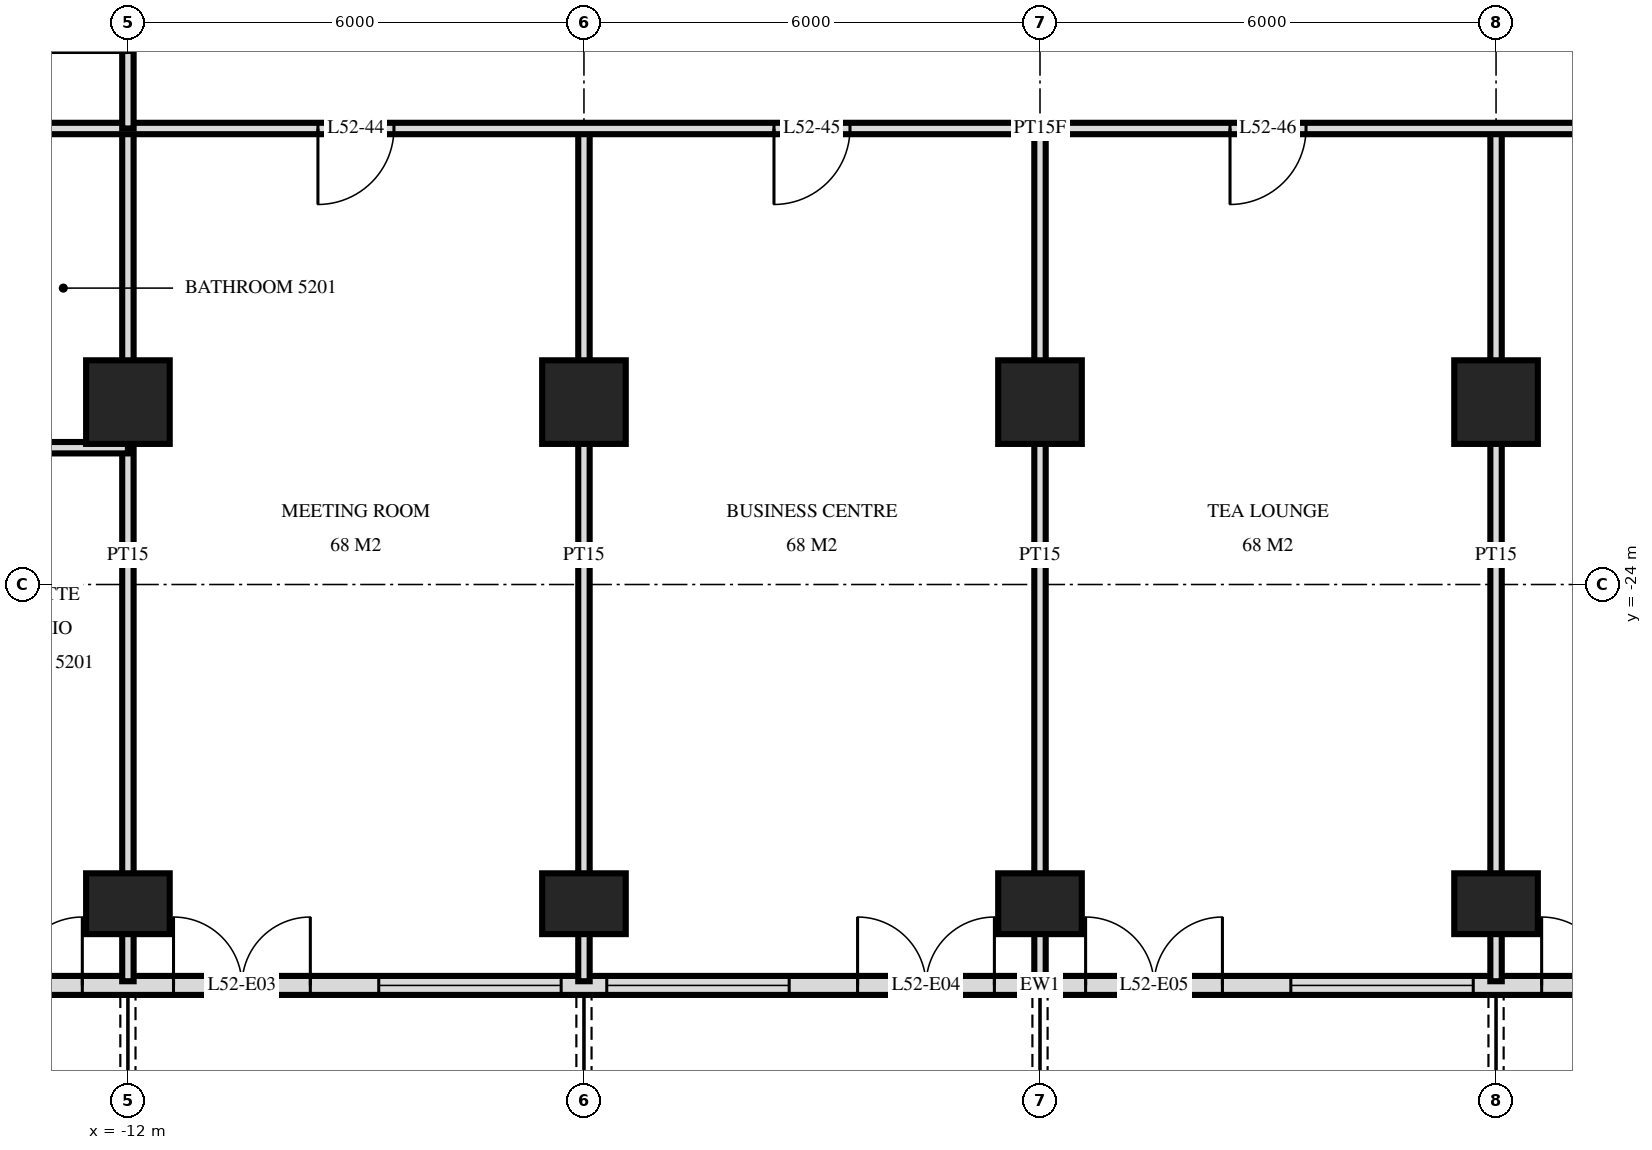
"""IFC4 building model, lengths in metres.
Left out: names, types, materials, properties, quantities, classifications, styles, units other than length and angle.
Written with IfcOpenShell. Run it as: python <this file> out.ifc"""

import sys

from ifc_helpers import new_model, si_unit, direction, frame, frame_2d, origin, origin_2d, place, context, subcontext, project, spatial, rectangle, extrude, element, fill, save


model = new_model("IFC4")
c1 = context("Model", 3, precision=1e-05, world=origin(), true_north=direction((0.0, 1.0)))
c2 = subcontext(c1, "Body", "Model", "MODEL_VIEW")
j1 = project(units=[si_unit("LENGTHUNIT", "METRE"), si_unit("PLANEANGLEUNIT", "RADIAN")], contexts=[c1])
p1 = place(None, origin())
s1 = spatial("IfcSite", under=j1, at=p1, CompositionType="ELEMENT")
p2 = place(p1, origin())
s2 = spatial("IfcBuilding", under=s1, at=p2, CompositionType="ELEMENT")
p3 = place(p2, frame((0.0, 0.0, 201.1)))
s3 = spatial("IfcBuildingStorey", under=s2, at=p3, CompositionType="ELEMENT", Elevation=201.1)
p4 = place(p3, frame((-12.0, -28.2, 0.0), z_axis=(0.0, 0.0, 1.0), x_axis=(1.0, 0.0, 0.0)))
e1 = element("IfcColumn", 1, at=p4, inside=s3, PredefinedType="COLUMN", context=c2, shape_type="SweptSolid", body=[
    extrude(rectangle(XDim=1.1, YDim=0.8, at=origin_2d()), origin(), (0.0, 0.0, 1.0), 3.5),
])
p5 = place(p3, frame((-12.0, -21.6, 0.0), z_axis=(0.0, 0.0, 1.0), x_axis=(1.0, 0.0, 0.0)))
e2 = element("IfcColumn", 2, at=p5, inside=s3, PredefinedType="COLUMN", context=c2, shape_type="SweptSolid", body=[
    extrude(rectangle(XDim=1.1, YDim=1.1, at=origin_2d()), origin(), (0.0, 0.0, 1.0), 3.5),
])
p6 = place(p3, frame((-6.0, -28.2, 0.0), z_axis=(0.0, 0.0, 1.0), x_axis=(1.0, 0.0, 0.0)))
e3 = element("IfcColumn", 3, at=p6, inside=s3, PredefinedType="COLUMN", context=c2, shape_type="SweptSolid", body=[
    extrude(rectangle(XDim=1.1, YDim=0.8, at=origin_2d()), origin(), (0.0, 0.0, 1.0), 3.5),
])
p7 = place(p3, frame((-6.0, -21.6, 0.0), z_axis=(0.0, 0.0, 1.0), x_axis=(1.0, 0.0, 0.0)))
e4 = element("IfcColumn", 4, at=p7, inside=s3, PredefinedType="COLUMN", context=c2, shape_type="SweptSolid", body=[
    extrude(rectangle(XDim=1.1, YDim=1.1, at=origin_2d()), origin(), (0.0, 0.0, 1.0), 3.5),
])
p8 = place(p3, frame((0.0, -28.2, 0.0), z_axis=(0.0, 0.0, 1.0), x_axis=(1.0, 0.0, 0.0)))
e5 = element("IfcColumn", 5, at=p8, inside=s3, PredefinedType="COLUMN", context=c2, shape_type="SweptSolid", body=[
    extrude(rectangle(XDim=1.1, YDim=0.8, at=origin_2d()), origin(), (0.0, 0.0, 1.0), 3.5),
])
p9 = place(p3, frame((0.0, -21.6, 0.0), z_axis=(0.0, 0.0, 1.0), x_axis=(1.0, 0.0, 0.0)))
e6 = element("IfcColumn", 6, at=p9, inside=s3, PredefinedType="COLUMN", context=c2, shape_type="SweptSolid", body=[
    extrude(rectangle(XDim=1.1, YDim=1.1, at=origin_2d()), origin(), (0.0, 0.0, 1.0), 3.5),
])
p10 = place(p3, frame((6.0, -28.2, 0.0), z_axis=(0.0, 0.0, 1.0), x_axis=(1.0, 0.0, 0.0)))
e7 = element("IfcColumn", 7, at=p10, inside=s3, PredefinedType="COLUMN", context=c2, shape_type="SweptSolid", body=[
    extrude(rectangle(XDim=1.1, YDim=0.8, at=origin_2d()), origin(), (0.0, 0.0, 1.0), 3.5),
])
p11 = place(p3, frame((6.0, -21.6, 0.0), z_axis=(0.0, 0.0, 1.0), x_axis=(1.0, 0.0, 0.0)))
e8 = element("IfcColumn", 8, at=p11, inside=s3, PredefinedType="COLUMN", context=c2, shape_type="SweptSolid", body=[
    extrude(rectangle(XDim=1.1, YDim=1.1, at=origin_2d()), origin(), (0.0, 0.0, 1.0), 3.5),
])
p12 = place(p3, frame((-22.475, -29.275, 0.0), z_axis=(0.0, 0.0, 1.0), x_axis=(1.0, 0.0, 0.0)))
e9 = element("IfcWall", 9, at=p12, inside=s3, PredefinedType="SOLIDWALL", context=c2, shape_type="SweptSolid", body=[
    extrude(rectangle(XDim=44.951, YDim=0.25, at=frame_2d((22.475, 0.0))), origin(), (0.0, 0.0, 1.0), 3.22),
])
p13 = place(p12, frame((0.575, 0.0, 0.0)))
e10 = element("IfcOpeningElement", 10, at=p13, cuts=e9, PredefinedType="OPENING", context=c2, shape_type="SweptSolid", body=[
    extrude(rectangle(XDim=1.8, YDim=2.4, at=frame_2d((0.9, 1.2))), frame((0.0, 0.135, 0.0), z_axis=(0.0, -1.0, 0.0), x_axis=(1.0, 0.0, 0.0)), (0.0, 0.0, 1.0), 0.27),
])
p14 = place(p12, frame((4.775, 0.0, 0.9)))
e11 = element("IfcOpeningElement", 11, at=p14, cuts=e9, PredefinedType="OPENING", context=c2, shape_type="SweptSolid", body=[
    extrude(rectangle(XDim=2.4, YDim=1.5, at=frame_2d((1.2, 0.75))), frame((0.0, 0.135, 0.0), z_axis=(0.0, -1.0, 0.0), x_axis=(1.0, 0.0, 0.0)), (0.0, 0.0, 1.0), 0.27),
])
p15 = place(p12, frame((8.075, 0.0, 0.0)))
e12 = element("IfcOpeningElement", 12, at=p15, cuts=e9, PredefinedType="OPENING", context=c2, shape_type="SweptSolid", body=[
    extrude(rectangle(XDim=1.8, YDim=2.4, at=frame_2d((0.9, 1.2))), frame((0.0, 0.135, 0.0), z_axis=(0.0, -1.0, 0.0), x_axis=(1.0, 0.0, 0.0)), (0.0, 0.0, 1.0), 0.27),
])
p16 = place(p12, frame((11.075, 0.0, 0.0)))
e13 = element("IfcOpeningElement", 13, at=p16, cuts=e9, PredefinedType="OPENING", context=c2, shape_type="SweptSolid", body=[
    extrude(rectangle(XDim=1.8, YDim=2.4, at=frame_2d((0.9, 1.2))), frame((0.0, 0.135, 0.0), z_axis=(0.0, -1.0, 0.0), x_axis=(1.0, 0.0, 0.0)), (0.0, 0.0, 1.0), 0.27),
])
p17 = place(p12, frame((13.775, 0.0, 0.9)))
e14 = element("IfcOpeningElement", 14, at=p17, cuts=e9, PredefinedType="OPENING", context=c2, shape_type="SweptSolid", body=[
    extrude(rectangle(XDim=2.4, YDim=1.5, at=frame_2d((1.2, 0.75))), frame((0.0, 0.135, 0.0), z_axis=(0.0, -1.0, 0.0), x_axis=(1.0, 0.0, 0.0)), (0.0, 0.0, 1.0), 0.27),
])
p18 = place(p12, frame((16.775, 0.0, 0.9)))
e15 = element("IfcOpeningElement", 15, at=p18, cuts=e9, PredefinedType="OPENING", context=c2, shape_type="SweptSolid", body=[
    extrude(rectangle(XDim=2.4, YDim=1.5, at=frame_2d((1.2, 0.75))), frame((0.0, 0.135, 0.0), z_axis=(0.0, -1.0, 0.0), x_axis=(1.0, 0.0, 0.0)), (0.0, 0.0, 1.0), 0.27),
])
p19 = place(p12, frame((20.075, 0.0, 0.0)))
e16 = element("IfcOpeningElement", 16, at=p19, cuts=e9, PredefinedType="OPENING", context=c2, shape_type="SweptSolid", body=[
    extrude(rectangle(XDim=1.8, YDim=2.4, at=frame_2d((0.9, 1.2))), frame((0.0, 0.135, 0.0), z_axis=(0.0, -1.0, 0.0), x_axis=(1.0, 0.0, 0.0)), (0.0, 0.0, 1.0), 0.27),
])
p20 = place(p12, frame((23.075, 0.0, 0.0)))
e17 = element("IfcOpeningElement", 17, at=p20, cuts=e9, PredefinedType="OPENING", context=c2, shape_type="SweptSolid", body=[
    extrude(rectangle(XDim=1.8, YDim=2.4, at=frame_2d((0.9, 1.2))), frame((0.0, 0.135, 0.0), z_axis=(0.0, -1.0, 0.0), x_axis=(1.0, 0.0, 0.0)), (0.0, 0.0, 1.0), 0.27),
])
p21 = place(p12, frame((25.775, 0.0, 0.9)))
e18 = element("IfcOpeningElement", 18, at=p21, cuts=e9, PredefinedType="OPENING", context=c2, shape_type="SweptSolid", body=[
    extrude(rectangle(XDim=2.4, YDim=1.5, at=frame_2d((1.2, 0.75))), frame((0.0, 0.135, 0.0), z_axis=(0.0, -1.0, 0.0), x_axis=(1.0, 0.0, 0.0)), (0.0, 0.0, 1.0), 0.27),
])
p22 = place(p12, frame((29.075, 0.0, 0.0)))
e19 = element("IfcOpeningElement", 19, at=p22, cuts=e9, PredefinedType="OPENING", context=c2, shape_type="SweptSolid", body=[
    extrude(rectangle(XDim=1.8, YDim=2.4, at=frame_2d((0.9, 1.2))), frame((0.0, 0.135, 0.0), z_axis=(0.0, -1.0, 0.0), x_axis=(1.0, 0.0, 0.0)), (0.0, 0.0, 1.0), 0.27),
])
p23 = place(p12, frame((31.775, 0.0, 0.9)))
e20 = element("IfcOpeningElement", 20, at=p23, cuts=e9, PredefinedType="OPENING", context=c2, shape_type="SweptSolid", body=[
    extrude(rectangle(XDim=2.4, YDim=1.5, at=frame_2d((1.2, 0.75))), frame((0.0, 0.135, 0.0), z_axis=(0.0, -1.0, 0.0), x_axis=(1.0, 0.0, 0.0)), (0.0, 0.0, 1.0), 0.27),
])
p24 = place(p12, frame((35.075, 0.0, 0.0)))
e21 = element("IfcOpeningElement", 21, at=p24, cuts=e9, PredefinedType="OPENING", context=c2, shape_type="SweptSolid", body=[
    extrude(rectangle(XDim=1.8, YDim=2.4, at=frame_2d((0.9, 1.2))), frame((0.0, 0.135, 0.0), z_axis=(0.0, -1.0, 0.0), x_axis=(1.0, 0.0, 0.0)), (0.0, 0.0, 1.0), 0.27),
])
p25 = place(p12, frame((37.775, 0.0, 0.9)))
e22 = element("IfcOpeningElement", 22, at=p25, cuts=e9, PredefinedType="OPENING", context=c2, shape_type="SweptSolid", body=[
    extrude(rectangle(XDim=2.4, YDim=1.5, at=frame_2d((1.2, 0.75))), frame((0.0, 0.135, 0.0), z_axis=(0.0, -1.0, 0.0), x_axis=(1.0, 0.0, 0.0)), (0.0, 0.0, 1.0), 0.27),
])
p26 = place(p12, frame((41.075, 0.0, 0.0)))
e23 = element("IfcOpeningElement", 23, at=p26, cuts=e9, PredefinedType="OPENING", context=c2, shape_type="SweptSolid", body=[
    extrude(rectangle(XDim=1.8, YDim=2.4, at=frame_2d((0.9, 1.2))), frame((0.0, 0.135, 0.0), z_axis=(0.0, -1.0, 0.0), x_axis=(1.0, 0.0, 0.0)), (0.0, 0.0, 1.0), 0.27),
])
for number, where, z_axis, x_axis in (
    (24, (6.0, -29.22, 0.0), (0.0, 0.0, 1.0), (0.0, 1.0, 0.0)),
    (25, (0.0, -29.22, 0.0), (0.0, 0.0, 1.0), (0.0, 1.0, 0.0)),
    (26, (-6.0, -29.22, 0.0), (0.0, 0.0, 1.0), (0.0, 1.0, 0.0)),
):
    element("IfcWall", number, at=place(p3, frame(where, z_axis=z_axis, x_axis=x_axis)), inside=s3, PredefinedType="PARTITIONING", context=c2, shape_type="SweptSolid", body=[
        extrude(rectangle(XDim=11.22, YDim=0.15, at=frame_2d((5.61, 0.0))), origin(), (0.0, 0.0, 1.0), 3.22),
    ])
p27 = place(p3, frame((-12.0, -18.0, 0.0), z_axis=(0.0, 0.0, 1.0), x_axis=(0.0, 1.0, 0.0)))
e27 = element("IfcWall", 27, at=p27, inside=s3, PredefinedType="PARTITIONING", context=c2, shape_type="SweptSolid", body=[
    extrude(rectangle(XDim=2.95, YDim=0.15, at=frame_2d((1.475, 0.0))), origin(), (0.0, 0.0, 1.0), 3.22),
])
p28 = place(p27, frame((1.0, 0.0, 0.0)))
e28 = element("IfcOpeningElement", 28, at=p28, cuts=e27, PredefinedType="OPENING", context=c2, shape_type="SweptSolid", body=[
    extrude(rectangle(XDim=1.0, YDim=2.1, at=frame_2d((0.5, 1.05))), frame((0.0, 0.085, 0.0), z_axis=(0.0, -1.0, 0.0), x_axis=(1.0, 0.0, 0.0)), (0.0, 0.0, 1.0), 0.17),
])
p29 = place(p3, frame((-12.0, -29.22, 0.0), z_axis=(0.0, 0.0, 1.0), x_axis=(0.0, 1.0, 0.0)))
e29 = element("IfcWall", 29, at=p29, inside=s3, PredefinedType="PARTITIONING", context=c2, shape_type="SweptSolid", body=[
    extrude(rectangle(XDim=11.22, YDim=0.15, at=frame_2d((5.61, 0.0))), origin(), (0.0, 0.0, 1.0), 3.22),
])
p30 = place(p3, frame((-13.7, -22.2, 0.0), z_axis=(0.0, 0.0, 1.0), x_axis=(1.0, 0.0, 0.0)))
e30 = element("IfcWall", 30, at=p30, inside=s3, PredefinedType="PARTITIONING", context=c2, shape_type="SweptSolid", body=[
    extrude(rectangle(XDim=1.7, YDim=0.15, at=frame_2d((0.85, 0.0))), origin(), (0.0, 0.0, 1.0), 3.22),
])
p31 = place(p3, frame((-26.82, -18.0, 0.0), z_axis=(0.0, 0.0, 1.0), x_axis=(1.0, 0.0, 0.0)))
e31 = element("IfcWall", 31, at=p31, inside=s3, PredefinedType="PARTITIONING", context=c2, shape_type="SweptSolid", body=[
    extrude(rectangle(XDim=53.64, YDim=0.15, at=frame_2d((26.82, 0.0))), origin(), (0.0, 0.0, 1.0), 3.22),
])
p32 = place(p31, frame((11.97, 0.0, 0.0)))
e32 = element("IfcOpeningElement", 32, at=p32, cuts=e31, PredefinedType="OPENING", context=c2, shape_type="SweptSolid", body=[
    extrude(rectangle(XDim=1.0, YDim=2.1, at=frame_2d((0.5, 1.05))), frame((0.0, 0.085, 0.0), z_axis=(0.0, -1.0, 0.0), x_axis=(1.0, 0.0, 0.0)), (0.0, 0.0, 1.0), 0.17),
])
p33 = place(p31, frame((3.92, 0.0, 0.0)))
e33 = element("IfcOpeningElement", 33, at=p33, cuts=e31, PredefinedType="OPENING", context=c2, shape_type="SweptSolid", body=[
    extrude(rectangle(XDim=1.0, YDim=2.1, at=frame_2d((0.5, 1.05))), frame((0.0, 0.085, 0.0), z_axis=(0.0, -1.0, 0.0), x_axis=(1.0, 0.0, 0.0)), (0.0, 0.0, 1.0), 0.17),
])
p34 = place(p31, frame((5.72, 0.0, 0.0)))
e34 = element("IfcOpeningElement", 34, at=p34, cuts=e31, PredefinedType="OPENING", context=c2, shape_type="SweptSolid", body=[
    extrude(rectangle(XDim=1.0, YDim=2.1, at=frame_2d((0.5, 1.05))), frame((0.0, 0.085, 0.0), z_axis=(0.0, -1.0, 0.0), x_axis=(1.0, 0.0, 0.0)), (0.0, 0.0, 1.0), 0.17),
])
p35 = place(p31, frame((40.67, 0.0, 0.0)))
e35 = element("IfcOpeningElement", 35, at=p35, cuts=e31, PredefinedType="OPENING", context=c2, shape_type="SweptSolid", body=[
    extrude(rectangle(XDim=1.0, YDim=2.1, at=frame_2d((0.5, 1.05))), frame((0.0, 0.085, 0.0), z_axis=(0.0, -1.0, 0.0), x_axis=(1.0, 0.0, 0.0)), (0.0, 0.0, 1.0), 0.17),
])
p36 = place(p31, frame((48.72, 0.0, 0.0)))
e36 = element("IfcOpeningElement", 36, at=p36, cuts=e31, PredefinedType="OPENING", context=c2, shape_type="SweptSolid", body=[
    extrude(rectangle(XDim=1.0, YDim=2.1, at=frame_2d((0.5, 1.05))), frame((0.0, 0.085, 0.0), z_axis=(0.0, -1.0, 0.0), x_axis=(1.0, 0.0, 0.0)), (0.0, 0.0, 1.0), 0.17),
])
p37 = place(p31, frame((46.92, 0.0, 0.0)))
e37 = element("IfcOpeningElement", 37, at=p37, cuts=e31, PredefinedType="OPENING", context=c2, shape_type="SweptSolid", body=[
    extrude(rectangle(XDim=1.0, YDim=2.1, at=frame_2d((0.5, 1.05))), frame((0.0, 0.085, 0.0), z_axis=(0.0, -1.0, 0.0), x_axis=(1.0, 0.0, 0.0)), (0.0, 0.0, 1.0), 0.17),
])
p38 = place(p31, frame((17.32, 0.0, 0.0)))
e38 = element("IfcOpeningElement", 38, at=p38, cuts=e31, PredefinedType="OPENING", context=c2, shape_type="SweptSolid", body=[
    extrude(rectangle(XDim=1.0, YDim=2.1, at=frame_2d((0.5, 1.05))), frame((0.0, 0.085, 0.0), z_axis=(0.0, -1.0, 0.0), x_axis=(1.0, 0.0, 0.0)), (0.0, 0.0, 1.0), 0.17),
])
p39 = place(p31, frame((23.32, 0.0, 0.0)))
e39 = element("IfcOpeningElement", 39, at=p39, cuts=e31, PredefinedType="OPENING", context=c2, shape_type="SweptSolid", body=[
    extrude(rectangle(XDim=1.0, YDim=2.1, at=frame_2d((0.5, 1.05))), frame((0.0, 0.085, 0.0), z_axis=(0.0, -1.0, 0.0), x_axis=(1.0, 0.0, 0.0)), (0.0, 0.0, 1.0), 0.17),
])
p40 = place(p31, frame((29.32, 0.0, 0.0)))
e40 = element("IfcOpeningElement", 40, at=p40, cuts=e31, PredefinedType="OPENING", context=c2, shape_type="SweptSolid", body=[
    extrude(rectangle(XDim=1.0, YDim=2.1, at=frame_2d((0.5, 1.05))), frame((0.0, 0.085, 0.0), z_axis=(0.0, -1.0, 0.0), x_axis=(1.0, 0.0, 0.0)), (0.0, 0.0, 1.0), 0.17),
])
p41 = place(p31, frame((35.32, 0.0, 0.0)))
e41 = element("IfcOpeningElement", 41, at=p41, cuts=e31, PredefinedType="OPENING", context=c2, shape_type="SweptSolid", body=[
    extrude(rectangle(XDim=1.0, YDim=2.1, at=frame_2d((0.5, 1.05))), frame((0.0, 0.085, 0.0), z_axis=(0.0, -1.0, 0.0), x_axis=(1.0, 0.0, 0.0)), (0.0, 0.0, 1.0), 0.17),
])
p42 = place(p15, origin())
e42 = element("IfcDoor", 42, at=p42, inside=s3, OperationType="DOUBLE_DOOR_SINGLE_SWING", PredefinedType="DOOR", context=c2, shape_type="SweptSolid", body=[
    extrude(rectangle(XDim=1.8, YDim=2.4, at=frame_2d((0.9, 1.2))), frame((0.0, 0.025, 0.0), z_axis=(0.0, -1.0, 0.0), x_axis=(1.0, 0.0, 0.0)), (0.0, 0.0, 1.0), 0.05),
])
fill(e12, e42)
p43 = place(p16, origin())
e43 = element("IfcDoor", 43, at=p43, inside=s3, OperationType="DOUBLE_DOOR_SINGLE_SWING", PredefinedType="DOOR", context=c2, shape_type="SweptSolid", body=[
    extrude(rectangle(XDim=1.8, YDim=2.4, at=frame_2d((0.9, 1.2))), frame((0.0, 0.025, 0.0), z_axis=(0.0, -1.0, 0.0), x_axis=(1.0, 0.0, 0.0)), (0.0, 0.0, 1.0), 0.05),
])
fill(e13, e43)
p44 = place(p17, origin())
e44 = element("IfcWindow", 44, at=p44, inside=s3, PartitioningType="SINGLE_PANEL", PredefinedType="WINDOW", context=c2, shape_type="SweptSolid", body=[
    extrude(rectangle(XDim=2.4, YDim=1.5, at=frame_2d((1.2, 0.75))), frame((0.0, 0.03, 0.0), z_axis=(0.0, -1.0, 0.0), x_axis=(1.0, 0.0, 0.0)), (0.0, 0.0, 1.0), 0.06),
])
fill(e14, e44)
p45 = place(p18, origin())
e45 = element("IfcWindow", 45, at=p45, inside=s3, PartitioningType="SINGLE_PANEL", PredefinedType="WINDOW", context=c2, shape_type="SweptSolid", body=[
    extrude(rectangle(XDim=2.4, YDim=1.5, at=frame_2d((1.2, 0.75))), frame((0.0, 0.03, 0.0), z_axis=(0.0, -1.0, 0.0), x_axis=(1.0, 0.0, 0.0)), (0.0, 0.0, 1.0), 0.06),
])
fill(e15, e45)
p46 = place(p19, origin())
e46 = element("IfcDoor", 46, at=p46, inside=s3, OperationType="DOUBLE_DOOR_SINGLE_SWING", PredefinedType="DOOR", context=c2, shape_type="SweptSolid", body=[
    extrude(rectangle(XDim=1.8, YDim=2.4, at=frame_2d((0.9, 1.2))), frame((0.0, 0.025, 0.0), z_axis=(0.0, -1.0, 0.0), x_axis=(1.0, 0.0, 0.0)), (0.0, 0.0, 1.0), 0.05),
])
fill(e16, e46)
p47 = place(p20, origin())
e47 = element("IfcDoor", 47, at=p47, inside=s3, OperationType="DOUBLE_DOOR_SINGLE_SWING", PredefinedType="DOOR", context=c2, shape_type="SweptSolid", body=[
    extrude(rectangle(XDim=1.8, YDim=2.4, at=frame_2d((0.9, 1.2))), frame((0.0, 0.025, 0.0), z_axis=(0.0, -1.0, 0.0), x_axis=(1.0, 0.0, 0.0)), (0.0, 0.0, 1.0), 0.05),
])
fill(e17, e47)
p48 = place(p21, origin())
e48 = element("IfcWindow", 48, at=p48, inside=s3, PartitioningType="SINGLE_PANEL", PredefinedType="WINDOW", context=c2, shape_type="SweptSolid", body=[
    extrude(rectangle(XDim=2.4, YDim=1.5, at=frame_2d((1.2, 0.75))), frame((0.0, 0.03, 0.0), z_axis=(0.0, -1.0, 0.0), x_axis=(1.0, 0.0, 0.0)), (0.0, 0.0, 1.0), 0.06),
])
fill(e18, e48)
p49 = place(p22, origin())
e49 = element("IfcDoor", 49, at=p49, inside=s3, OperationType="DOUBLE_DOOR_SINGLE_SWING", PredefinedType="DOOR", context=c2, shape_type="SweptSolid", body=[
    extrude(rectangle(XDim=1.8, YDim=2.4, at=frame_2d((0.9, 1.2))), frame((0.0, 0.025, 0.0), z_axis=(0.0, -1.0, 0.0), x_axis=(1.0, 0.0, 0.0)), (0.0, 0.0, 1.0), 0.05),
])
fill(e19, e49)
p50 = place(p38, frame((0.5, 0.0, 0.0), z_axis=(0.0, 0.0, 1.0), x_axis=(-1.0, 0.0, 0.0)))
e50 = element("IfcDoor", 50, at=p50, inside=s3, OperationType="SINGLE_SWING_LEFT", PredefinedType="DOOR", context=c2, shape_type="SweptSolid", body=[
    extrude(rectangle(XDim=1.0, YDim=2.1, at=frame_2d((0.0, 1.05))), frame((0.0, -0.025, 0.0), z_axis=(0.0, 1.0, 0.0), x_axis=(-1.0, 0.0, 0.0)), (0.0, 0.0, 1.0), 0.05),
])
fill(e38, e50)
p51 = place(p39, frame((0.5, 0.0, 0.0), z_axis=(0.0, 0.0, 1.0), x_axis=(-1.0, 0.0, 0.0)))
e51 = element("IfcDoor", 51, at=p51, inside=s3, OperationType="SINGLE_SWING_LEFT", PredefinedType="DOOR", context=c2, shape_type="SweptSolid", body=[
    extrude(rectangle(XDim=1.0, YDim=2.1, at=frame_2d((0.0, 1.05))), frame((0.0, -0.025, 0.0), z_axis=(0.0, 1.0, 0.0), x_axis=(-1.0, 0.0, 0.0)), (0.0, 0.0, 1.0), 0.05),
])
fill(e39, e51)
p52 = place(p40, frame((0.5, 0.0, 0.0), z_axis=(0.0, 0.0, 1.0), x_axis=(-1.0, 0.0, 0.0)))
e52 = element("IfcDoor", 52, at=p52, inside=s3, OperationType="SINGLE_SWING_LEFT", PredefinedType="DOOR", context=c2, shape_type="SweptSolid", body=[
    extrude(rectangle(XDim=1.0, YDim=2.1, at=frame_2d((0.0, 1.05))), frame((0.0, -0.025, 0.0), z_axis=(0.0, 1.0, 0.0), x_axis=(-1.0, 0.0, 0.0)), (0.0, 0.0, 1.0), 0.05),
])
fill(e40, e52)
save(model, sys.argv[1])
